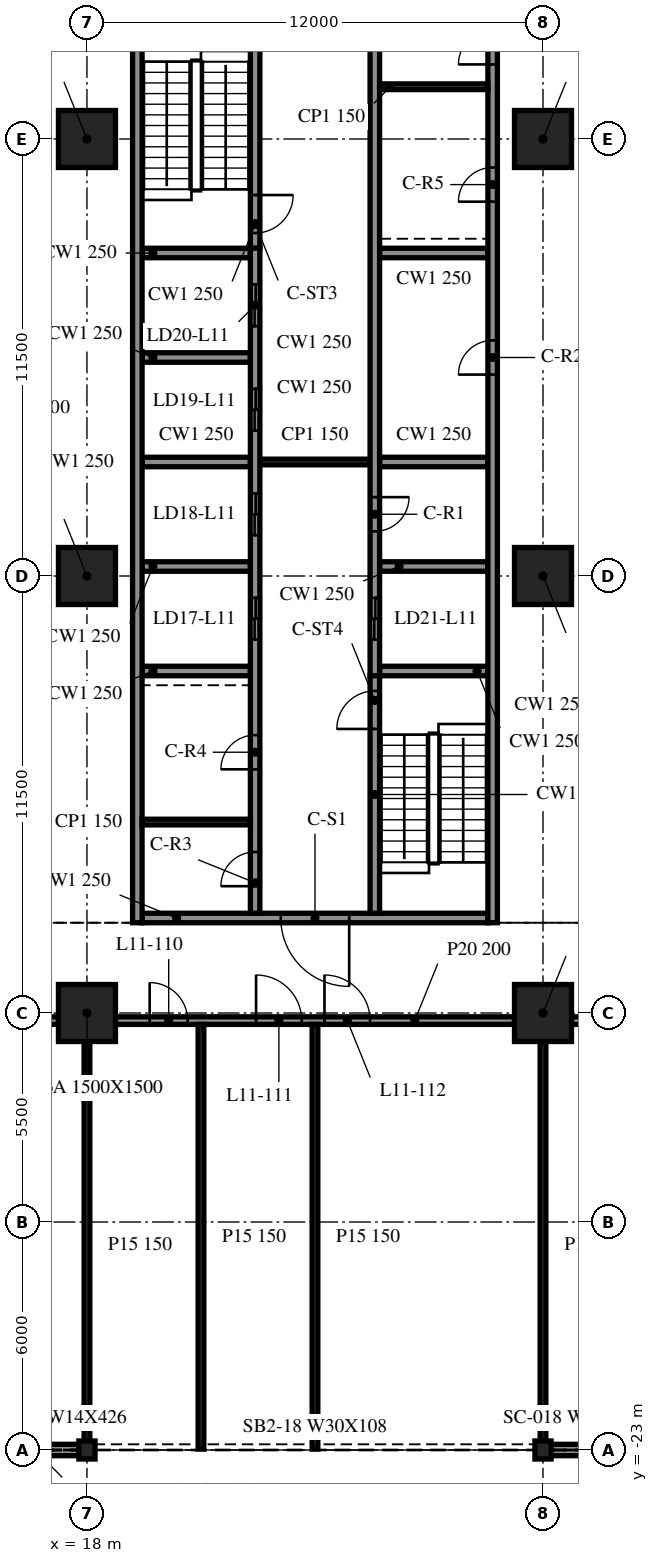
"""IFC4 building model, lengths in metres.
Left out: names, types, materials, properties, quantities, classifications, styles, units other than length and angle.
Written with IfcOpenShell. Run it as: python <this file> out.ifc"""

import sys

from ifc_helpers import new_model, si_unit, direction, frame, frame_2d, origin, origin_2d, place, context, subcontext, project, spatial, rectangle, i_section, extrude, element, fill, save


model = new_model("IFC4")
c1 = context("Model", 3, precision=1e-05, world=origin(), true_north=direction((0.0, 1.0)))
c2 = subcontext(c1, "Body", "Model", "MODEL_VIEW")
j1 = project(units=[si_unit("LENGTHUNIT", "METRE"), si_unit("PLANEANGLEUNIT", "RADIAN")], contexts=[c1])
p1 = place(None, origin())
s1 = spatial("IfcSite", under=j1, at=p1, CompositionType="ELEMENT")
p2 = place(p1, origin())
s2 = spatial("IfcBuilding", under=s1, at=p2, CompositionType="ELEMENT")
p3 = place(p2, frame((0.0, 0.0, 50.3)))
s3 = spatial("IfcBuildingStorey", under=s2, at=p3, CompositionType="ELEMENT", Elevation=50.3)
for number, where, z_axis, x_axis in (
    (1, (18.0, -11.5, -0.34), (0.0, 0.0, 1.0), (1.0, 0.0, 0.0)),
    (2, (18.0, 0.0, -0.34), (0.0, 0.0, 1.0), (1.0, 0.0, 0.0)),
    (3, (18.0, 11.5, -0.34), (0.0, 0.0, 1.0), (1.0, 0.0, 0.0)),
    (4, (30.0, -11.5, -0.34), (0.0, 0.0, 1.0), (1.0, 0.0, 0.0)),
    (5, (30.0, 0.0, -0.34), (0.0, 0.0, 1.0), (1.0, 0.0, 0.0)),
    (6, (30.0, 11.5, -0.34), (0.0, 0.0, 1.0), (1.0, 0.0, 0.0)),
):
    element("IfcColumn", number, at=place(p3, frame(where, z_axis=z_axis, x_axis=x_axis)), inside=s3, PredefinedType="COLUMN", context=c2, shape_type="SweptSolid", body=[
        extrude(rectangle(XDim=1.5, YDim=1.5, at=origin_2d()), origin(), (0.0, 0.0, 1.0), 4.3),
    ])
for number, where, z_axis, x_axis in (
    (7, (18.0, -23.0, -0.34), (0.0, 0.0, 1.0), (1.0, 0.0, 0.0)),
    (8, (30.0, -23.0, -0.34), (0.0, 0.0, 1.0), (1.0, 0.0, 0.0)),
):
    element("IfcColumn", number, at=place(p3, frame(where, z_axis=z_axis, x_axis=x_axis)), inside=s3, PredefinedType="COLUMN", context=c2, shape_type="SweptSolid", body=[
        extrude(i_section(OverallWidth=0.424, OverallDepth=0.475, WebThickness=0.048, FlangeThickness=0.077, at=origin_2d()), origin(), (0.0, 0.0, 1.0), 4.3),
    ])
for number, where, z_axis, x_axis in (
    (9, (6.024, -23.0, 0.0), (0.0, 0.0, 1.0), (1.0, 0.0, 0.0)),
    (10, (30.024, -23.0, 0.0), (0.0, 0.0, 1.0), (1.0, 0.0, 0.0)),
):
    element("IfcWall", number, at=place(p3, frame(where, z_axis=z_axis, x_axis=x_axis)), inside=s3, PredefinedType="NOTDEFINED", context=c2, shape_type="SweptSolid", body=[
        extrude(rectangle(XDim=11.952, YDim=0.3, at=frame_2d((5.976, 0.0))), origin(), (0.0, 0.0, 1.0), 3.203),
    ])
p4 = place(p3, frame((19.325, 15.125, 0.0), z_axis=(0.0, 0.0, 1.0), x_axis=(0.0, -1.0, 0.0)))
e11 = element("IfcWall", 11, at=p4, inside=s3, PredefinedType="SOLIDWALL", context=c2, shape_type="SweptSolid", body=[
    extrude(rectangle(XDim=24.25, YDim=0.25, at=frame_2d((12.125, 0.0))), origin(), (0.0, 0.0, 1.0), 3.96),
])
p5 = place(p3, frame((28.675, -9.125, 0.0), z_axis=(0.0, 0.0, 1.0), x_axis=(0.0, 1.0, 0.0)))
e12 = element("IfcWall", 12, at=p5, inside=s3, PredefinedType="SOLIDWALL", context=c2, shape_type="SweptSolid", body=[
    extrude(rectangle(XDim=24.25, YDim=0.25, at=frame_2d((12.125, 0.0))), origin(), (0.0, 0.0, 1.0), 3.96),
])
p6 = place(p5, frame((14.425, 0.0, 0.0)))
e13 = element("IfcOpeningElement", 13, at=p6, cuts=e12, PredefinedType="OPENING", context=c2, shape_type="SweptSolid", body=[
    extrude(rectangle(XDim=0.9, YDim=2.1, at=frame_2d((0.45, 1.05))), frame((0.0, 0.135, 0.0), z_axis=(0.0, -1.0, 0.0), x_axis=(1.0, 0.0, 0.0)), (0.0, 0.0, 1.0), 0.27),
])
p7 = place(p5, frame((18.975, 0.0, 0.0)))
e14 = element("IfcOpeningElement", 14, at=p7, cuts=e12, PredefinedType="OPENING", context=c2, shape_type="SweptSolid", body=[
    extrude(rectangle(XDim=0.9, YDim=2.1, at=frame_2d((0.45, 1.05))), frame((0.0, 0.135, 0.0), z_axis=(0.0, -1.0, 0.0), x_axis=(1.0, 0.0, 0.0)), (0.0, 0.0, 1.0), 0.27),
])
p8 = place(p5, frame((22.587, 0.0, 0.0)))
e15 = element("IfcOpeningElement", 15, at=p8, cuts=e12, PredefinedType="OPENING", context=c2, shape_type="SweptSolid", body=[
    extrude(rectangle(XDim=0.9, YDim=2.1, at=frame_2d((0.45, 1.05))), frame((0.0, 0.135, 0.0), z_axis=(0.0, -1.0, 0.0), x_axis=(1.0, 0.0, 0.0)), (0.0, 0.0, 1.0), 0.27),
])
p9 = place(p3, frame((28.55, -9.0, 0.0), z_axis=(0.0, 0.0, 1.0), x_axis=(-1.0, 0.0, 0.0)))
e16 = element("IfcWall", 16, at=p9, inside=s3, PredefinedType="SOLIDWALL", context=c2, shape_type="SweptSolid", body=[
    extrude(rectangle(XDim=9.1, YDim=0.25, at=frame_2d((4.55, 0.0))), origin(), (0.0, 0.0, 1.0), 3.96),
])
p10 = place(p9, frame((3.65, 0.0, 0.0)))
e17 = element("IfcOpeningElement", 17, at=p10, cuts=e16, PredefinedType="OPENING", context=c2, shape_type="SweptSolid", body=[
    extrude(rectangle(XDim=1.8, YDim=2.1, at=frame_2d((0.9, 1.05))), frame((0.0, 0.135, 0.0), z_axis=(0.0, -1.0, 0.0), x_axis=(1.0, 0.0, 0.0)), (0.0, 0.0, 1.0), 0.27),
])
p11 = place(p3, frame((22.425, -8.875, 0.0), z_axis=(0.0, 0.0, 1.0), x_axis=(0.0, 1.0, 0.0)))
e18 = element("IfcWall", 18, at=p11, inside=s3, PredefinedType="SOLIDWALL", context=c2, shape_type="SweptSolid", body=[
    extrude(rectangle(XDim=17.5, YDim=0.25, at=frame_2d((8.75, 0.0))), origin(), (0.0, 0.0, 1.0), 3.96),
])
p12 = place(p11, frame((7.2, 0.0, 0.0)))
e19 = element("IfcOpeningElement", 19, at=p12, cuts=e18, PredefinedType="OPENING", context=c2, shape_type="SweptSolid", body=[
    extrude(rectangle(XDim=1.1, YDim=2.1, at=frame_2d((0.55, 1.05))), frame((0.0, 0.135, 0.0), z_axis=(0.0, -1.0, 0.0), x_axis=(1.0, 0.0, 0.0)), (0.0, 0.0, 1.0), 0.27),
])
p13 = place(p11, frame((9.95, 0.0, 0.0)))
e20 = element("IfcOpeningElement", 20, at=p13, cuts=e18, PredefinedType="OPENING", context=c2, shape_type="SweptSolid", body=[
    extrude(rectangle(XDim=1.1, YDim=2.1, at=frame_2d((0.55, 1.05))), frame((0.0, 0.135, 0.0), z_axis=(0.0, -1.0, 0.0), x_axis=(1.0, 0.0, 0.0)), (0.0, 0.0, 1.0), 0.27),
])
p14 = place(p11, frame((12.7, 0.0, 0.0)))
e21 = element("IfcOpeningElement", 21, at=p14, cuts=e18, PredefinedType="OPENING", context=c2, shape_type="SweptSolid", body=[
    extrude(rectangle(XDim=1.1, YDim=2.1, at=frame_2d((0.55, 1.05))), frame((0.0, 0.135, 0.0), z_axis=(0.0, -1.0, 0.0), x_axis=(1.0, 0.0, 0.0)), (0.0, 0.0, 1.0), 0.27),
])
p15 = place(p11, frame((15.45, 0.0, 0.0)))
e22 = element("IfcOpeningElement", 22, at=p15, cuts=e18, PredefinedType="OPENING", context=c2, shape_type="SweptSolid", body=[
    extrude(rectangle(XDim=1.1, YDim=2.1, at=frame_2d((0.55, 1.05))), frame((0.0, 0.135, 0.0), z_axis=(0.0, -1.0, 0.0), x_axis=(1.0, 0.0, 0.0)), (0.0, 0.0, 1.0), 0.27),
])
p16 = place(p11, frame((0.712, 0.0, 0.0)))
e23 = element("IfcOpeningElement", 23, at=p16, cuts=e18, PredefinedType="OPENING", context=c2, shape_type="SweptSolid", body=[
    extrude(rectangle(XDim=0.9, YDim=2.1, at=frame_2d((0.45, 1.05))), frame((0.0, 0.135, 0.0), z_axis=(0.0, -1.0, 0.0), x_axis=(1.0, 0.0, 0.0)), (0.0, 0.0, 1.0), 0.27),
])
p17 = place(p11, frame((3.788, 0.0, 0.0)))
e24 = element("IfcOpeningElement", 24, at=p17, cuts=e18, PredefinedType="OPENING", context=c2, shape_type="SweptSolid", body=[
    extrude(rectangle(XDim=0.9, YDim=2.1, at=frame_2d((0.45, 1.05))), frame((0.0, 0.135, 0.0), z_axis=(0.0, -1.0, 0.0), x_axis=(1.0, 0.0, 0.0)), (0.0, 0.0, 1.0), 0.27),
])
p18 = place(p3, frame((22.425, 14.875, 0.0), z_axis=(0.0, 0.0, 1.0), x_axis=(0.0, -1.0, 0.0)))
e25 = element("IfcWall", 25, at=p18, inside=s3, PredefinedType="SOLIDWALL", context=c2, shape_type="SweptSolid", body=[
    extrude(rectangle(XDim=6.25, YDim=0.25, at=frame_2d((3.125, 0.0))), origin(), (0.0, 0.0, 1.0), 3.96),
])
p19 = place(p18, frame((4.85, 0.0, 0.0)))
e26 = element("IfcOpeningElement", 26, at=p19, cuts=e25, PredefinedType="OPENING", context=c2, shape_type="SweptSolid", body=[
    extrude(rectangle(XDim=1.0, YDim=2.1, at=frame_2d((0.5, 1.05))), frame((0.0, 0.135, 0.0), z_axis=(0.0, -1.0, 0.0), x_axis=(1.0, 0.0, 0.0)), (0.0, 0.0, 1.0), 0.27),
])
p20 = place(p3, frame((25.575, -8.875, 0.0), z_axis=(0.0, 0.0, 1.0), x_axis=(0.0, 1.0, 0.0)))
e27 = element("IfcWall", 27, at=p20, inside=s3, PredefinedType="SOLIDWALL", context=c2, shape_type="SweptSolid", body=[
    extrude(rectangle(XDim=6.25, YDim=0.25, at=frame_2d((3.125, 0.0))), origin(), (0.0, 0.0, 1.0), 3.96),
])
p21 = place(p20, frame((4.85, 0.0, 0.0)))
e28 = element("IfcOpeningElement", 28, at=p21, cuts=e27, PredefinedType="OPENING", context=c2, shape_type="SweptSolid", body=[
    extrude(rectangle(XDim=1.0, YDim=2.1, at=frame_2d((0.5, 1.05))), frame((0.0, 0.135, 0.0), z_axis=(0.0, -1.0, 0.0), x_axis=(1.0, 0.0, 0.0)), (0.0, 0.0, 1.0), 0.27),
])
p22 = place(p3, frame((25.575, 14.875, 0.0), z_axis=(0.0, 0.0, 1.0), x_axis=(0.0, -1.0, 0.0)))
e29 = element("IfcWall", 29, at=p22, inside=s3, PredefinedType="SOLIDWALL", context=c2, shape_type="SweptSolid", body=[
    extrude(rectangle(XDim=17.5, YDim=0.25, at=frame_2d((8.75, 0.0))), origin(), (0.0, 0.0, 1.0), 3.96),
])
p23 = place(p22, frame((15.45, 0.0, 0.0)))
e30 = element("IfcOpeningElement", 30, at=p23, cuts=e29, PredefinedType="OPENING", context=c2, shape_type="SweptSolid", body=[
    extrude(rectangle(XDim=1.1, YDim=2.1, at=frame_2d((0.55, 1.05))), frame((0.0, 0.135, 0.0), z_axis=(0.0, -1.0, 0.0), x_axis=(1.0, 0.0, 0.0)), (0.0, 0.0, 1.0), 0.27),
])
p24 = place(p22, frame((12.8, 0.0, 0.0)))
e31 = element("IfcOpeningElement", 31, at=p24, cuts=e29, PredefinedType="OPENING", context=c2, shape_type="SweptSolid", body=[
    extrude(rectangle(XDim=0.9, YDim=2.1, at=frame_2d((0.45, 1.05))), frame((0.0, 0.135, 0.0), z_axis=(0.0, -1.0, 0.0), x_axis=(1.0, 0.0, 0.0)), (0.0, 0.0, 1.0), 0.27),
])
for number, where, z_axis, x_axis in (
    (32, (19.45, -2.5, 0.0), (0.0, 0.0, 1.0), (1.0, 0.0, 0.0)),
    (33, (19.45, 0.25, 0.0), (0.0, 0.0, 1.0), (1.0, 0.0, 0.0)),
    (34, (19.45, 3.0, 0.0), (0.0, 0.0, 1.0), (1.0, 0.0, 0.0)),
    (35, (19.45, 5.75, 0.0), (0.0, 0.0, 1.0), (1.0, 0.0, 0.0)),
    (36, (19.45, 8.5, 0.0), (0.0, 0.0, 1.0), (1.0, 0.0, 0.0)),
    (37, (25.7, -2.5, 0.0), (0.0, 0.0, 1.0), (1.0, 0.0, 0.0)),
    (38, (25.7, 0.25, 0.0), (0.0, 0.0, 1.0), (1.0, 0.0, 0.0)),
    (39, (25.7, 3.0, 0.0), (0.0, 0.0, 1.0), (1.0, 0.0, 0.0)),
    (40, (25.7, 8.5, 0.0), (0.0, 0.0, 1.0), (1.0, 0.0, 0.0)),
):
    element("IfcWall", number, at=place(p3, frame(where, z_axis=z_axis, x_axis=x_axis)), inside=s3, PredefinedType="SOLIDWALL", context=c2, shape_type="SweptSolid", body=[
        extrude(rectangle(XDim=2.85, YDim=0.25, at=frame_2d((1.425, 0.0))), origin(), (0.0, 0.0, 1.0), 3.96),
    ])
p25 = place(p3, frame((22.55, 3.0, 0.0), z_axis=(0.0, 0.0, 1.0), x_axis=(1.0, 0.0, 0.0)))
e41 = element("IfcWall", 41, at=p25, inside=s3, PredefinedType="PARTITIONING", context=c2, shape_type="SweptSolid", body=[
    extrude(rectangle(XDim=2.9, YDim=0.15, at=frame_2d((1.45, 0.0))), origin(), (0.0, 0.0, 1.0), 3.96),
])
for number, where, z_axis, x_axis in (
    (42, (19.45, -6.475, 0.0), (0.0, 0.0, 1.0), (1.0, 0.0, 0.0)),
    (43, (25.7, 12.875, 0.0), (0.0, 0.0, 1.0), (1.0, 0.0, 0.0)),
):
    element("IfcWall", number, at=place(p3, frame(where, z_axis=z_axis, x_axis=x_axis)), inside=s3, PredefinedType="PARTITIONING", context=c2, shape_type="SweptSolid", body=[
        extrude(rectangle(XDim=2.85, YDim=0.15, at=frame_2d((1.425, 0.0))), origin(), (0.0, 0.0, 1.0), 3.96),
    ])
p26 = place(p3, frame((6.75, -11.7, 0.0), z_axis=(0.0, 0.0, 1.0), x_axis=(1.0, 0.0, 0.0)))
e44 = element("IfcWall", 44, at=p26, inside=s3, PredefinedType="PARTITIONING", context=c2, shape_type="SweptSolid", body=[
    extrude(rectangle(XDim=10.5, YDim=0.2, at=frame_2d((5.25, 0.0))), origin(), (0.0, 0.0, 1.0), 3.96),
])
p27 = place(p26, frame((3.7, 0.0, 0.0)))
e45 = element("IfcOpeningElement", 45, at=p27, cuts=e44, PredefinedType="OPENING", context=c2, shape_type="SweptSolid", body=[
    extrude(rectangle(XDim=1.2, YDim=2.1, at=frame_2d((0.6, 1.05))), frame((0.0, 0.11, 0.0), z_axis=(0.0, -1.0, 0.0), x_axis=(1.0, 0.0, 0.0)), (0.0, 0.0, 1.0), 0.22),
])
p28 = place(p26, frame((5.5, 0.0, 0.0)))
e46 = element("IfcOpeningElement", 46, at=p28, cuts=e44, PredefinedType="OPENING", context=c2, shape_type="SweptSolid", body=[
    extrude(rectangle(XDim=1.2, YDim=2.1, at=frame_2d((0.6, 1.05))), frame((0.0, 0.11, 0.0), z_axis=(0.0, -1.0, 0.0), x_axis=(1.0, 0.0, 0.0)), (0.0, 0.0, 1.0), 0.22),
])
p29 = place(p3, frame((18.75, -11.7, 0.0), z_axis=(0.0, 0.0, 1.0), x_axis=(1.0, 0.0, 0.0)))
e47 = element("IfcWall", 47, at=p29, inside=s3, PredefinedType="PARTITIONING", context=c2, shape_type="SweptSolid", body=[
    extrude(rectangle(XDim=10.5, YDim=0.2, at=frame_2d((5.25, 0.0))), origin(), (0.0, 0.0, 1.0), 3.96),
])
p30 = place(p29, frame((0.9, 0.0, 0.0)))
e48 = element("IfcOpeningElement", 48, at=p30, cuts=e47, PredefinedType="OPENING", context=c2, shape_type="SweptSolid", body=[
    extrude(rectangle(XDim=1.0, YDim=2.1, at=frame_2d((0.5, 1.05))), frame((0.0, 0.11, 0.0), z_axis=(0.0, -1.0, 0.0), x_axis=(1.0, 0.0, 0.0)), (0.0, 0.0, 1.0), 0.22),
])
p31 = place(p29, frame((3.7, 0.0, 0.0)))
e49 = element("IfcOpeningElement", 49, at=p31, cuts=e47, PredefinedType="OPENING", context=c2, shape_type="SweptSolid", body=[
    extrude(rectangle(XDim=1.2, YDim=2.1, at=frame_2d((0.6, 1.05))), frame((0.0, 0.11, 0.0), z_axis=(0.0, -1.0, 0.0), x_axis=(1.0, 0.0, 0.0)), (0.0, 0.0, 1.0), 0.22),
])
p32 = place(p29, frame((5.5, 0.0, 0.0)))
e50 = element("IfcOpeningElement", 50, at=p32, cuts=e47, PredefinedType="OPENING", context=c2, shape_type="SweptSolid", body=[
    extrude(rectangle(XDim=1.2, YDim=2.1, at=frame_2d((0.6, 1.05))), frame((0.0, 0.11, 0.0), z_axis=(0.0, -1.0, 0.0), x_axis=(1.0, 0.0, 0.0)), (0.0, 0.0, 1.0), 0.22),
])
p33 = place(p3, frame((30.75, -11.7, 0.0), z_axis=(0.0, 0.0, 1.0), x_axis=(1.0, 0.0, 0.0)))
e51 = element("IfcWall", 51, at=p33, inside=s3, PredefinedType="PARTITIONING", context=c2, shape_type="SweptSolid", body=[
    extrude(rectangle(XDim=10.5, YDim=0.2, at=frame_2d((5.25, 0.0))), origin(), (0.0, 0.0, 1.0), 3.96),
])
p34 = place(p33, frame((4.7, 0.0, 0.0)))
e52 = element("IfcOpeningElement", 52, at=p34, cuts=e51, PredefinedType="OPENING", context=c2, shape_type="SweptSolid", body=[
    extrude(rectangle(XDim=1.2, YDim=2.1, at=frame_2d((0.6, 1.05))), frame((0.0, 0.11, 0.0), z_axis=(0.0, -1.0, 0.0), x_axis=(1.0, 0.0, 0.0)), (0.0, 0.0, 1.0), 0.22),
])
p35 = place(p3, frame((18.0, -22.975, 0.0), z_axis=(0.0, 0.0, 1.0), x_axis=(0.0, 1.0, 0.0)))
e53 = element("IfcWall", 53, at=p35, inside=s3, PredefinedType="PARTITIONING", context=c2, shape_type="SweptSolid", body=[
    extrude(rectangle(XDim=10.725, YDim=0.15, at=frame_2d((5.363, 0.0))), origin(), (0.0, 0.0, 1.0), 3.96),
])
for number, where, z_axis, x_axis in (
    (54, (21.0, -22.975, 0.0), (0.0, 0.0, 1.0), (0.0, 1.0, 0.0)),
    (55, (24.0, -22.975, 0.0), (0.0, 0.0, 1.0), (0.0, 1.0, 0.0)),
):
    element("IfcWall", number, at=place(p3, frame(where, z_axis=z_axis, x_axis=x_axis)), inside=s3, PredefinedType="PARTITIONING", context=c2, shape_type="SweptSolid", body=[
        extrude(rectangle(XDim=11.175, YDim=0.15, at=frame_2d((5.587, 0.0))), origin(), (0.0, 0.0, 1.0), 3.96),
    ])
p36 = place(p3, frame((30.0, -22.975, 0.0), z_axis=(0.0, 0.0, 1.0), x_axis=(0.0, 1.0, 0.0)))
e56 = element("IfcWall", 56, at=p36, inside=s3, PredefinedType="PARTITIONING", context=c2, shape_type="SweptSolid", body=[
    extrude(rectangle(XDim=10.725, YDim=0.15, at=frame_2d((5.363, 0.0))), origin(), (0.0, 0.0, 1.0), 3.96),
])
p37 = place(p10, origin())
e57 = element("IfcDoor", 57, at=p37, inside=s3, OperationType="DOUBLE_DOOR_SINGLE_SWING", PredefinedType="DOOR", context=c2, shape_type="SweptSolid", body=[
    extrude(rectangle(XDim=1.8, YDim=2.1, at=frame_2d((0.9, 1.05))), frame((0.0, 0.025, 0.0), z_axis=(0.0, -1.0, 0.0), x_axis=(1.0, 0.0, 0.0)), (0.0, 0.0, 1.0), 0.05),
])
fill(e17, e57)
p38 = place(p23, origin())
e58 = element("IfcDoor", 58, at=p38, inside=s3, OperationType="DOUBLE_DOOR_SLIDING", PredefinedType="DOOR", context=c2, shape_type="SweptSolid", body=[
    extrude(rectangle(XDim=1.1, YDim=2.1, at=frame_2d((0.55, 1.05))), frame((0.0, 0.025, 0.0), z_axis=(0.0, -1.0, 0.0), x_axis=(1.0, 0.0, 0.0)), (0.0, 0.0, 1.0), 0.05),
])
fill(e30, e58)
p39 = place(p12, origin())
e59 = element("IfcDoor", 59, at=p39, inside=s3, OperationType="DOUBLE_DOOR_SLIDING", PredefinedType="DOOR", context=c2, shape_type="SweptSolid", body=[
    extrude(rectangle(XDim=1.1, YDim=2.1, at=frame_2d((0.55, 1.05))), frame((0.0, 0.025, 0.0), z_axis=(0.0, -1.0, 0.0), x_axis=(1.0, 0.0, 0.0)), (0.0, 0.0, 1.0), 0.05),
])
fill(e19, e59)
p40 = place(p13, origin())
e60 = element("IfcDoor", 60, at=p40, inside=s3, OperationType="DOUBLE_DOOR_SLIDING", PredefinedType="DOOR", context=c2, shape_type="SweptSolid", body=[
    extrude(rectangle(XDim=1.1, YDim=2.1, at=frame_2d((0.55, 1.05))), frame((0.0, 0.025, 0.0), z_axis=(0.0, -1.0, 0.0), x_axis=(1.0, 0.0, 0.0)), (0.0, 0.0, 1.0), 0.05),
])
fill(e20, e60)
p41 = place(p14, origin())
e61 = element("IfcDoor", 61, at=p41, inside=s3, OperationType="DOUBLE_DOOR_SLIDING", PredefinedType="DOOR", context=c2, shape_type="SweptSolid", body=[
    extrude(rectangle(XDim=1.1, YDim=2.1, at=frame_2d((0.55, 1.05))), frame((0.0, 0.025, 0.0), z_axis=(0.0, -1.0, 0.0), x_axis=(1.0, 0.0, 0.0)), (0.0, 0.0, 1.0), 0.05),
])
fill(e21, e61)
p42 = place(p15, origin())
e62 = element("IfcDoor", 62, at=p42, inside=s3, OperationType="DOUBLE_DOOR_SLIDING", PredefinedType="DOOR", context=c2, shape_type="SweptSolid", body=[
    extrude(rectangle(XDim=1.1, YDim=2.1, at=frame_2d((0.55, 1.05))), frame((0.0, 0.025, 0.0), z_axis=(0.0, -1.0, 0.0), x_axis=(1.0, 0.0, 0.0)), (0.0, 0.0, 1.0), 0.05),
])
fill(e22, e62)
p43 = place(p24, origin())
e63 = element("IfcDoor", 63, at=p43, inside=s3, OperationType="SINGLE_SWING_LEFT", PredefinedType="DOOR", context=c2, shape_type="SweptSolid", body=[
    extrude(rectangle(XDim=0.9, YDim=2.1, at=frame_2d((0.45, 1.05))), frame((0.0, 0.025, 0.0), z_axis=(0.0, -1.0, 0.0), x_axis=(1.0, 0.0, 0.0)), (0.0, 0.0, 1.0), 0.05),
])
fill(e31, e63)
p44 = place(p6, origin())
e64 = element("IfcDoor", 64, at=p44, inside=s3, OperationType="SINGLE_SWING_RIGHT", PredefinedType="DOOR", context=c2, shape_type="SweptSolid", body=[
    extrude(rectangle(XDim=0.9, YDim=2.1, at=frame_2d((0.45, 1.05))), frame((0.0, 0.025, 0.0), z_axis=(0.0, -1.0, 0.0), x_axis=(1.0, 0.0, 0.0)), (0.0, 0.0, 1.0), 0.05),
])
fill(e13, e64)
p45 = place(p16, origin())
e65 = element("IfcDoor", 65, at=p45, inside=s3, OperationType="SINGLE_SWING_LEFT", PredefinedType="DOOR", context=c2, shape_type="SweptSolid", body=[
    extrude(rectangle(XDim=0.9, YDim=2.1, at=frame_2d((0.45, 1.05))), frame((0.0, 0.025, 0.0), z_axis=(0.0, -1.0, 0.0), x_axis=(1.0, 0.0, 0.0)), (0.0, 0.0, 1.0), 0.05),
])
fill(e23, e65)
p46 = place(p17, origin())
e66 = element("IfcDoor", 66, at=p46, inside=s3, OperationType="SINGLE_SWING_RIGHT", PredefinedType="DOOR", context=c2, shape_type="SweptSolid", body=[
    extrude(rectangle(XDim=0.9, YDim=2.1, at=frame_2d((0.45, 1.05))), frame((0.0, 0.025, 0.0), z_axis=(0.0, -1.0, 0.0), x_axis=(1.0, 0.0, 0.0)), (0.0, 0.0, 1.0), 0.05),
])
fill(e24, e66)
p47 = place(p7, origin())
e67 = element("IfcDoor", 67, at=p47, inside=s3, OperationType="SINGLE_SWING_LEFT", PredefinedType="DOOR", context=c2, shape_type="SweptSolid", body=[
    extrude(rectangle(XDim=0.9, YDim=2.1, at=frame_2d((0.45, 1.05))), frame((0.0, 0.025, 0.0), z_axis=(0.0, -1.0, 0.0), x_axis=(1.0, 0.0, 0.0)), (0.0, 0.0, 1.0), 0.05),
])
fill(e14, e67)
p48 = place(p8, origin())
e68 = element("IfcDoor", 68, at=p48, inside=s3, OperationType="SINGLE_SWING_RIGHT", PredefinedType="DOOR", context=c2, shape_type="SweptSolid", body=[
    extrude(rectangle(XDim=0.9, YDim=2.1, at=frame_2d((0.45, 1.05))), frame((0.0, 0.025, 0.0), z_axis=(0.0, -1.0, 0.0), x_axis=(1.0, 0.0, 0.0)), (0.0, 0.0, 1.0), 0.05),
])
fill(e15, e68)
p49 = place(p19, origin())
e69 = element("IfcDoor", 69, at=p49, inside=s3, OperationType="SINGLE_SWING_LEFT", PredefinedType="DOOR", context=c2, shape_type="SweptSolid", body=[
    extrude(rectangle(XDim=1.0, YDim=2.1, at=frame_2d((0.5, 1.05))), frame((0.0, 0.025, 0.0), z_axis=(0.0, -1.0, 0.0), x_axis=(1.0, 0.0, 0.0)), (0.0, 0.0, 1.0), 0.05),
])
fill(e26, e69)
p50 = place(p21, origin())
e70 = element("IfcDoor", 70, at=p50, inside=s3, OperationType="SINGLE_SWING_RIGHT", PredefinedType="DOOR", context=c2, shape_type="SweptSolid", body=[
    extrude(rectangle(XDim=1.0, YDim=2.1, at=frame_2d((0.5, 1.05))), frame((0.0, 0.025, 0.0), z_axis=(0.0, -1.0, 0.0), x_axis=(1.0, 0.0, 0.0)), (0.0, 0.0, 1.0), 0.05),
])
fill(e28, e70)
p51 = place(p30, origin())
e71 = element("IfcDoor", 71, at=p51, inside=s3, OperationType="SINGLE_SWING_RIGHT", PredefinedType="DOOR", context=c2, shape_type="SweptSolid", body=[
    extrude(rectangle(XDim=1.0, YDim=2.1, at=frame_2d((0.5, 1.05))), frame((0.0, 0.025, 0.0), z_axis=(0.0, -1.0, 0.0), x_axis=(1.0, 0.0, 0.0)), (0.0, 0.0, 1.0), 0.05),
])
fill(e48, e71)
p52 = place(p31, origin())
e72 = element("IfcDoor", 72, at=p52, inside=s3, OperationType="SINGLE_SWING_RIGHT", PredefinedType="DOOR", context=c2, shape_type="SweptSolid", body=[
    extrude(rectangle(XDim=1.2, YDim=2.1, at=frame_2d((0.6, 1.05))), frame((0.0, 0.025, 0.0), z_axis=(0.0, -1.0, 0.0), x_axis=(1.0, 0.0, 0.0)), (0.0, 0.0, 1.0), 0.05),
])
fill(e49, e72)
p53 = place(p32, origin())
e73 = element("IfcDoor", 73, at=p53, inside=s3, OperationType="SINGLE_SWING_LEFT", PredefinedType="DOOR", context=c2, shape_type="SweptSolid", body=[
    extrude(rectangle(XDim=1.2, YDim=2.1, at=frame_2d((0.6, 1.05))), frame((0.0, 0.025, 0.0), z_axis=(0.0, -1.0, 0.0), x_axis=(1.0, 0.0, 0.0)), (0.0, 0.0, 1.0), 0.05),
])
fill(e50, e73)
save(model, sys.argv[1])
